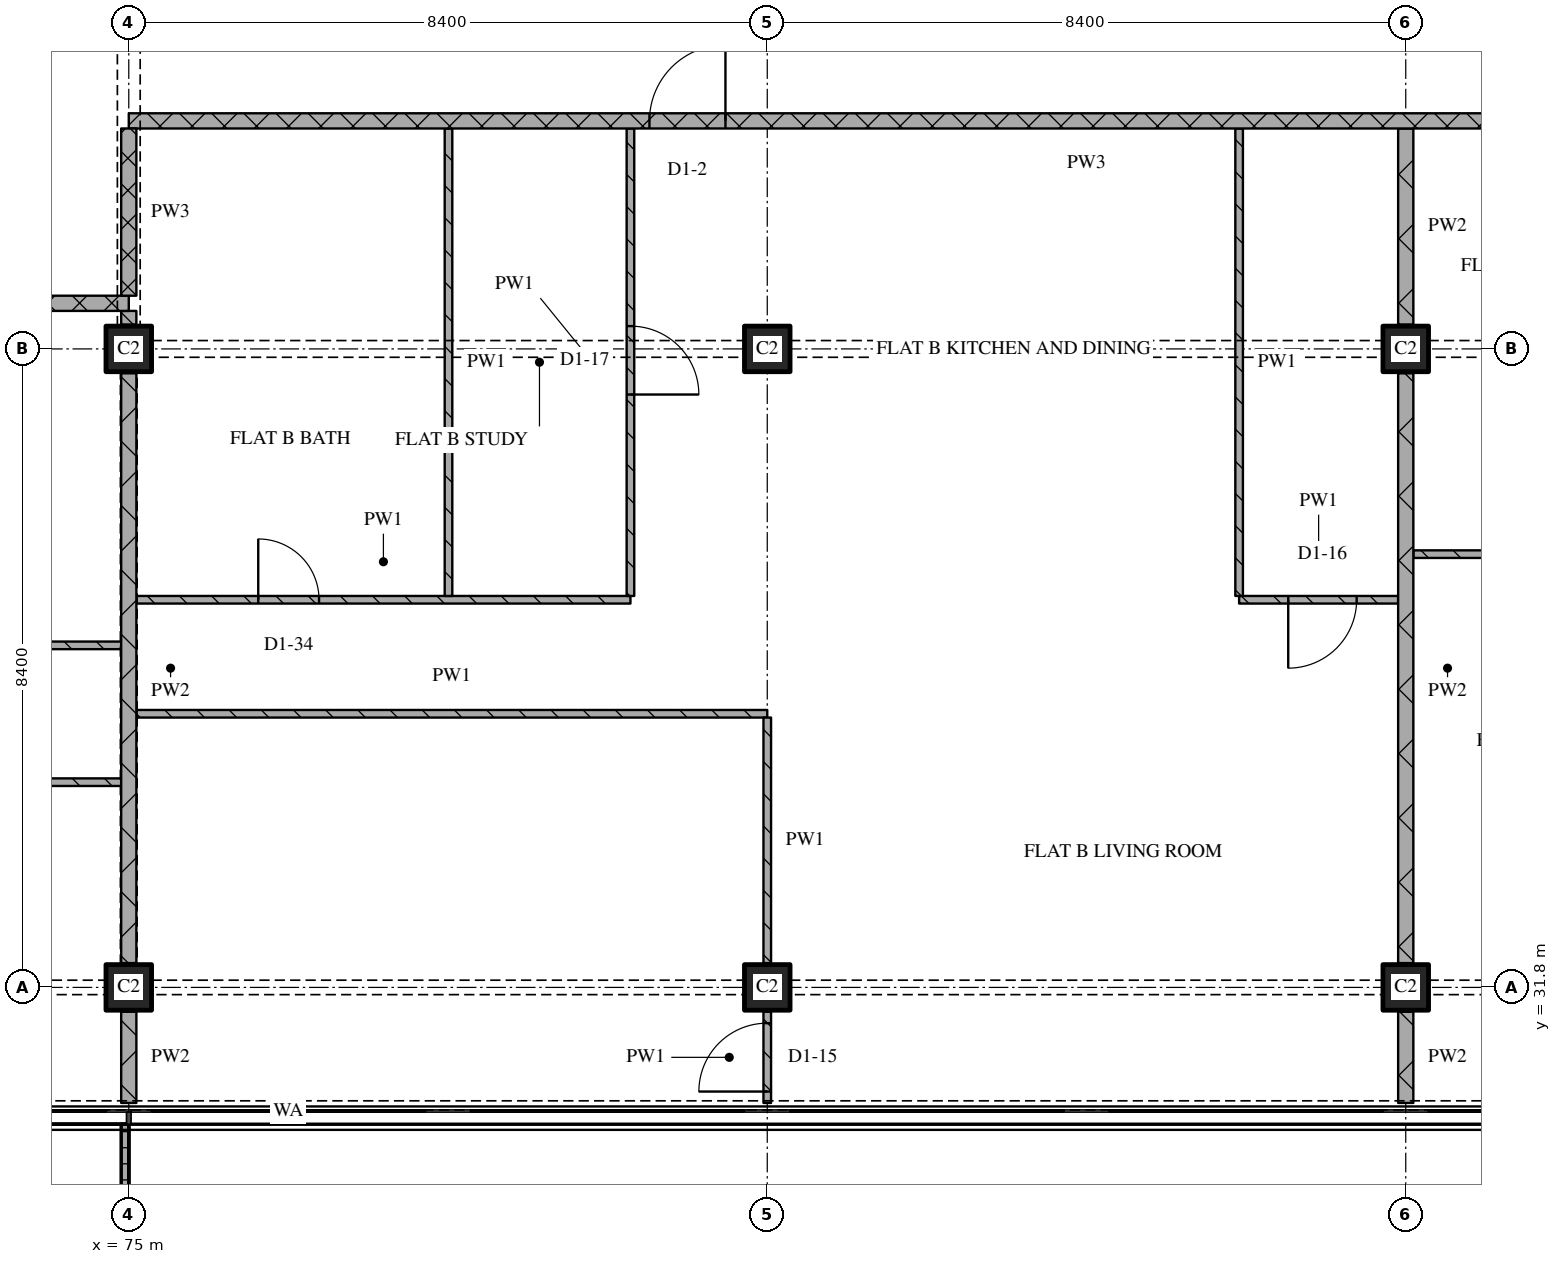
"""IFC4 building model, lengths in metres.
Left out: names, types, materials, properties, quantities, classifications, styles, units other than length and angle.
Written with IfcOpenShell. Run it as: python <this file> out.ifc"""

import sys

from ifc_helpers import new_model, si_unit, direction, frame, frame_2d, origin, origin_2d, place, context, subcontext, project, spatial, polyline, rectangle, outline, extrude, element, fill, save


model = new_model("IFC4")
c1 = context("Model", 3, precision=1e-05, world=origin(), true_north=direction((0.0, 1.0)))
c2 = subcontext(c1, "Body", "Model", "MODEL_VIEW")
j1 = project(units=[si_unit("LENGTHUNIT", "METRE"), si_unit("PLANEANGLEUNIT", "RADIAN")], contexts=[c1])
p1 = place(None, origin())
s1 = spatial("IfcSite", under=j1, at=p1, CompositionType="ELEMENT")
p2 = place(p1, origin())
s2 = spatial("IfcBuilding", under=s1, at=p2, CompositionType="ELEMENT")
p3 = place(p2, frame((0.0, 0.0, 212.7)))
s3 = spatial("IfcBuildingStorey", under=s2, at=p3, CompositionType="ELEMENT", Elevation=212.7)
for number, where, z_axis, x_axis in (
    (1, (75.0, 31.8, 0.0), (0.0, 0.0, 1.0), (1.0, 0.0, 0.0)),
    (2, (75.0, 40.2, 0.0), (0.0, 0.0, 1.0), (1.0, 0.0, 0.0)),
    (3, (83.4, 31.8, 0.0), (0.0, 0.0, 1.0), (1.0, 0.0, 0.0)),
    (4, (83.4, 40.2, 0.0), (0.0, 0.0, 1.0), (1.0, 0.0, 0.0)),
    (5, (91.8, 31.8, 0.0), (0.0, 0.0, 1.0), (1.0, 0.0, 0.0)),
    (6, (91.8, 40.2, 0.0), (0.0, 0.0, 1.0), (1.0, 0.0, 0.0)),
):
    element("IfcColumn", number, at=place(p3, frame(where, z_axis=z_axis, x_axis=x_axis)), inside=s3, PredefinedType="COLUMN", context=c2, shape_type="SweptSolid", body=[
        extrude(rectangle(XDim=0.6, YDim=0.6, at=origin_2d()), origin(), (0.0, 0.0, 1.0), 3.6),
    ])
p4 = place(p3, origin())
e7 = element("IfcWall", 7, at=p4, inside=s3, PredefinedType="SOLIDWALL", context=c2, shape_type="SweptSolid", body=[
    extrude(outline(polyline([(70.8, 30.0), (70.9, 30.0), (70.9, 28.367), (74.9, 28.367), (74.9, 30.0), (75.0, 30.0), (75.0, 28.267), (70.8, 28.267), (70.8, 30.0)])), origin(), (0.0, 0.0, 1.0), 1.0),
])
p5 = place(p3, frame((74.9, 34.5, 0.0), z_axis=(0.0, 0.0, 1.0), x_axis=(-1.0, 0.0, 0.0)))
e8 = element("IfcWall", 8, at=p5, inside=s3, PredefinedType="PARTITIONING", context=c2, shape_type="SweptSolid", body=[
    extrude(rectangle(XDim=12.5, YDim=0.1, at=frame_2d((6.25, 0.0))), origin(), (0.0, 0.0, 1.0), 3.32),
])
p6 = place(p5, frame((1.55, 0.0, 0.0)))
e9 = element("IfcOpeningElement", 9, at=p6, cuts=e8, PredefinedType="OPENING", context=c2, shape_type="SweptSolid", body=[
    extrude(rectangle(XDim=0.9, YDim=2.1, at=frame_2d((0.45, 1.05))), frame((0.0, 0.06, 0.0), z_axis=(0.0, -1.0, 0.0), x_axis=(1.0, 0.0, 0.0)), (0.0, 0.0, 1.0), 0.12),
])
p7 = place(p5, frame((7.85, 0.0, 0.0)))
e10 = element("IfcOpeningElement", 10, at=p7, cuts=e8, PredefinedType="OPENING", context=c2, shape_type="SweptSolid", body=[
    extrude(rectangle(XDim=0.9, YDim=2.1, at=frame_2d((0.45, 1.05))), frame((0.0, 0.06, 0.0), z_axis=(0.0, -1.0, 0.0), x_axis=(1.0, 0.0, 0.0)), (0.0, 0.0, 1.0), 0.12),
])
p8 = place(p3, frame((75.1, 35.4, 0.0), z_axis=(0.0, 0.0, 1.0), x_axis=(1.0, 0.0, 0.0)))
e11 = element("IfcWall", 11, at=p8, inside=s3, PredefinedType="PARTITIONING", context=c2, shape_type="SweptSolid", body=[
    extrude(rectangle(XDim=8.3, YDim=0.1, at=frame_2d((4.15, 0.0))), origin(), (0.0, 0.0, 1.0), 3.32),
])
p9 = place(p3, frame((68.4, 36.3, 0.0), z_axis=(0.0, 0.0, 1.0), x_axis=(1.0, 0.0, 0.0)))
e12 = element("IfcWall", 12, at=p9, inside=s3, PredefinedType="PARTITIONING", context=c2, shape_type="SweptSolid", body=[
    extrude(rectangle(XDim=6.5, YDim=0.1, at=frame_2d((3.25, 0.0))), origin(), (0.0, 0.0, 1.0), 3.32),
])
p10 = place(p9, frame((2.85, 0.0, 0.0)))
e13 = element("IfcOpeningElement", 13, at=p10, cuts=e12, PredefinedType="OPENING", context=c2, shape_type="SweptSolid", body=[
    extrude(rectangle(XDim=0.9, YDim=2.1, at=frame_2d((0.45, 1.05))), frame((0.0, 0.06, 0.0), z_axis=(0.0, -1.0, 0.0), x_axis=(1.0, 0.0, 0.0)), (0.0, 0.0, 1.0), 0.12),
])
p11 = place(p3, frame((75.1, 36.9, 0.0), z_axis=(0.0, 0.0, 1.0), x_axis=(1.0, 0.0, 0.0)))
e14 = element("IfcWall", 14, at=p11, inside=s3, PredefinedType="PARTITIONING", context=c2, shape_type="SweptSolid", body=[
    extrude(rectangle(XDim=6.5, YDim=0.1, at=frame_2d((3.25, 0.0))), origin(), (0.0, 0.0, 1.0), 3.32),
])
p12 = place(p11, frame((1.603, 0.0, 0.0)))
e15 = element("IfcOpeningElement", 15, at=p12, cuts=e14, PredefinedType="OPENING", context=c2, shape_type="SweptSolid", body=[
    extrude(rectangle(XDim=0.8, YDim=2.1, at=frame_2d((0.4, 1.05))), frame((0.0, 0.06, 0.0), z_axis=(0.0, -1.0, 0.0), x_axis=(1.0, 0.0, 0.0)), (0.0, 0.0, 1.0), 0.12),
])
p13 = place(p3, frame((89.608, 36.9, 0.0), z_axis=(0.0, 0.0, 1.0), x_axis=(1.0, 0.0, 0.0)))
e16 = element("IfcWall", 16, at=p13, inside=s3, PredefinedType="PARTITIONING", context=c2, shape_type="SweptSolid", body=[
    extrude(rectangle(XDim=2.092, YDim=0.1, at=frame_2d((1.046, 0.0))), origin(), (0.0, 0.0, 1.0), 3.32),
])
p14 = place(p13, frame((0.646, 0.0, 0.0)))
e17 = element("IfcOpeningElement", 17, at=p14, cuts=e16, PredefinedType="OPENING", context=c2, shape_type="SweptSolid", body=[
    extrude(rectangle(XDim=0.9, YDim=2.1, at=frame_2d((0.45, 1.05))), frame((0.0, 0.06, 0.0), z_axis=(0.0, -1.0, 0.0), x_axis=(1.0, 0.0, 0.0)), (0.0, 0.0, 1.0), 0.12),
])
p15 = place(p3, frame((91.9, 37.5, 0.0), z_axis=(0.0, 0.0, 1.0), x_axis=(1.0, 0.0, 0.0)))
e18 = element("IfcWall", 18, at=p15, inside=s3, PredefinedType="PARTITIONING", context=c2, shape_type="SweptSolid", body=[
    extrude(rectangle(XDim=2.9, YDim=0.1, at=frame_2d((1.45, 0.0))), origin(), (0.0, 0.0, 1.0), 3.32),
])
p16 = place(p15, frame((1.0, 0.0, 0.0)))
e19 = element("IfcOpeningElement", 19, at=p16, cuts=e18, PredefinedType="OPENING", context=c2, shape_type="SweptSolid", body=[
    extrude(rectangle(XDim=0.8, YDim=2.1, at=frame_2d((0.4, 1.05))), frame((0.0, 0.06, 0.0), z_axis=(0.0, -1.0, 0.0), x_axis=(1.0, 0.0, 0.0)), (0.0, 0.0, 1.0), 0.12),
])
p17 = place(p3, frame((75.0, 40.8, 0.0), z_axis=(0.0, 0.0, 1.0), x_axis=(-1.0, 0.0, 0.0)))
e20 = element("IfcWall", 20, at=p17, inside=s3, PredefinedType="PARTITIONING", context=c2, shape_type="SweptSolid", body=[
    extrude(rectangle(XDim=24.38, YDim=0.2, at=frame_2d((12.19, 0.0))), origin(), (0.0, 0.0, 1.0), 3.32),
])
p18 = place(p17, frame((14.35, 0.0, 0.0)))
e21 = element("IfcOpeningElement", 21, at=p18, cuts=e20, PredefinedType="OPENING", context=c2, shape_type="SweptSolid", body=[
    extrude(rectangle(XDim=1.0, YDim=2.1, at=frame_2d((0.5, 1.05))), frame((0.0, 0.11, 0.0), z_axis=(0.0, -1.0, 0.0), x_axis=(1.0, 0.0, 0.0)), (0.0, 0.0, 1.0), 0.22),
])
p19 = place(p3, frame((100.2, 43.2, 0.0), z_axis=(0.0, 0.0, 1.0), x_axis=(-1.0, 0.0, 0.0)))
e22 = element("IfcWall", 22, at=p19, inside=s3, PredefinedType="PARTITIONING", context=c2, shape_type="SweptSolid", body=[
    extrude(rectangle(XDim=25.2, YDim=0.2, at=frame_2d((12.6, 0.0))), origin(), (0.0, 0.0, 1.0), 3.32),
])
p20 = place(p19, frame((4.15, 0.0, 0.0)))
e23 = element("IfcOpeningElement", 23, at=p20, cuts=e22, PredefinedType="OPENING", context=c2, shape_type="SweptSolid", body=[
    extrude(rectangle(XDim=1.0, YDim=2.1, at=frame_2d((0.5, 1.05))), frame((0.0, 0.11, 0.0), z_axis=(0.0, -1.0, 0.0), x_axis=(1.0, 0.0, 0.0)), (0.0, 0.0, 1.0), 0.22),
])
p21 = place(p19, frame((17.35, 0.0, 0.0)))
e24 = element("IfcOpeningElement", 24, at=p21, cuts=e22, PredefinedType="OPENING", context=c2, shape_type="SweptSolid", body=[
    extrude(rectangle(XDim=1.0, YDim=2.1, at=frame_2d((0.5, 1.05))), frame((0.0, 0.11, 0.0), z_axis=(0.0, -1.0, 0.0), x_axis=(1.0, 0.0, 0.0)), (0.0, 0.0, 1.0), 0.22),
])
p22 = place(p3, frame((75.0, 43.1, 0.0), z_axis=(0.0, 0.0, 1.0), x_axis=(0.0, -1.0, 0.0)))
e25 = element("IfcWall", 25, at=p22, inside=s3, PredefinedType="PARTITIONING", context=c2, shape_type="SweptSolid", body=[
    extrude(rectangle(XDim=2.2, YDim=0.2, at=frame_2d((1.1, 0.0))), origin(), (0.0, 0.0, 1.0), 2.53),
])
p23 = place(p3, frame((75.0, 31.48, 0.0), z_axis=(0.0, 0.0, 1.0), x_axis=(0.0, -1.0, 0.0)))
e26 = element("IfcWall", 26, at=p23, inside=s3, PredefinedType="PARTITIONING", context=c2, shape_type="SweptSolid", body=[
    extrude(rectangle(XDim=1.2, YDim=0.2, at=frame_2d((0.6, 0.0))), origin(), (0.0, 0.0, 1.0), 3.32),
])
p24 = place(p3, frame((75.0, 39.88, 0.0), z_axis=(0.0, 0.0, 1.0), x_axis=(0.0, -1.0, 0.0)))
e27 = element("IfcWall", 27, at=p24, inside=s3, PredefinedType="PARTITIONING", context=c2, shape_type="SweptSolid", body=[
    extrude(rectangle(XDim=7.76, YDim=0.2, at=frame_2d((3.88, 0.0))), origin(), (0.0, 0.0, 1.0), 2.72),
])
p25 = place(p3, frame((75.0, 40.7, 0.0), z_axis=(0.0, 0.0, 1.0), x_axis=(0.0, -1.0, 0.0)))
e28 = element("IfcWall", 28, at=p25, inside=s3, PredefinedType="PARTITIONING", context=c2, shape_type="SweptSolid", body=[
    extrude(rectangle(XDim=0.18, YDim=0.2, at=frame_2d((0.09, 0.0))), origin(), (0.0, 0.0, 1.0), 3.32),
])
p26 = place(p3, frame((79.206, 43.1, 0.0), z_axis=(0.0, 0.0, 1.0), x_axis=(0.0, -1.0, 0.0)))
e29 = element("IfcWall", 29, at=p26, inside=s3, PredefinedType="PARTITIONING", context=c2, shape_type="SweptSolid", body=[
    extrude(rectangle(XDim=6.15, YDim=0.1, at=frame_2d((3.075, 0.0))), origin(), (0.0, 0.0, 1.0), 3.32),
])
p27 = place(p3, frame((81.6, 36.95, 0.0), z_axis=(0.0, 0.0, 1.0), x_axis=(0.0, 1.0, 0.0)))
e30 = element("IfcWall", 30, at=p27, inside=s3, PredefinedType="PARTITIONING", context=c2, shape_type="SweptSolid", body=[
    extrude(rectangle(XDim=6.15, YDim=0.1, at=frame_2d((3.075, 0.0))), origin(), (0.0, 0.0, 1.0), 3.32),
])
p28 = place(p27, frame((2.65, 0.0, 0.0)))
e31 = element("IfcOpeningElement", 31, at=p28, cuts=e30, PredefinedType="OPENING", context=c2, shape_type="SweptSolid", body=[
    extrude(rectangle(XDim=0.9, YDim=2.1, at=frame_2d((0.45, 1.05))), frame((0.0, 0.06, 0.0), z_axis=(0.0, -1.0, 0.0), x_axis=(1.0, 0.0, 0.0)), (0.0, 0.0, 1.0), 0.12),
])
p29 = place(p3, frame((83.4, 30.28, 0.0), z_axis=(0.0, 0.0, 1.0), x_axis=(0.0, 1.0, 0.0)))
e32 = element("IfcWall", 32, at=p29, inside=s3, PredefinedType="PARTITIONING", context=c2, shape_type="SweptSolid", body=[
    extrude(rectangle(XDim=1.2, YDim=0.1, at=frame_2d((0.6, 0.0))), origin(), (0.0, 0.0, 1.0), 3.32),
])
p30 = place(p29, frame((0.15, 0.0, 0.0)))
e33 = element("IfcOpeningElement", 33, at=p30, cuts=e32, PredefinedType="OPENING", context=c2, shape_type="SweptSolid", body=[
    extrude(rectangle(XDim=0.9, YDim=2.1, at=frame_2d((0.45, 1.05))), frame((0.0, 0.06, 0.0), z_axis=(0.0, -1.0, 0.0), x_axis=(1.0, 0.0, 0.0)), (0.0, 0.0, 1.0), 0.12),
])
p31 = place(p3, frame((83.4, 35.35, 0.0), z_axis=(0.0, 0.0, 1.0), x_axis=(0.0, -1.0, 0.0)))
e34 = element("IfcWall", 34, at=p31, inside=s3, PredefinedType="PARTITIONING", context=c2, shape_type="SweptSolid", body=[
    extrude(rectangle(XDim=3.23, YDim=0.1, at=frame_2d((1.615, 0.0))), origin(), (0.0, 0.0, 1.0), 3.32),
])
p32 = place(p3, frame((89.608, 43.1, 0.0), z_axis=(0.0, 0.0, 1.0), x_axis=(0.0, -1.0, 0.0)))
e35 = element("IfcWall", 35, at=p32, inside=s3, PredefinedType="PARTITIONING", context=c2, shape_type="SweptSolid", body=[
    extrude(rectangle(XDim=6.15, YDim=0.1, at=frame_2d((3.075, 0.0))), origin(), (0.0, 0.0, 1.0), 3.32),
])
p33 = place(p3, frame((91.8, 31.48, 0.0), z_axis=(0.0, 0.0, 1.0), x_axis=(0.0, -1.0, 0.0)))
e36 = element("IfcWall", 36, at=p33, inside=s3, PredefinedType="PARTITIONING", context=c2, shape_type="SweptSolid", body=[
    extrude(rectangle(XDim=1.2, YDim=0.2, at=frame_2d((0.6, 0.0))), origin(), (0.0, 0.0, 1.0), 3.32),
])
p34 = place(p3, frame((91.8, 39.88, 0.0), z_axis=(0.0, 0.0, 1.0), x_axis=(0.0, -1.0, 0.0)))
e37 = element("IfcWall", 37, at=p34, inside=s3, PredefinedType="PARTITIONING", context=c2, shape_type="SweptSolid", body=[
    extrude(rectangle(XDim=7.76, YDim=0.2, at=frame_2d((3.88, 0.0))), origin(), (0.0, 0.0, 1.0), 3.32),
])
p35 = place(p3, frame((91.8, 43.1, 0.0), z_axis=(0.0, 0.0, 1.0), x_axis=(0.0, -1.0, 0.0)))
e38 = element("IfcWall", 38, at=p35, inside=s3, PredefinedType="PARTITIONING", context=c2, shape_type="SweptSolid", body=[
    extrude(rectangle(XDim=2.58, YDim=0.2, at=frame_2d((1.29, 0.0))), origin(), (0.0, 0.0, 1.0), 3.32),
])
p36 = place(p12, origin())
e39 = element("IfcDoor", 39, at=p36, inside=s3, OperationType="SINGLE_SWING_LEFT", PredefinedType="DOOR", context=c2, shape_type="SweptSolid", body=[
    extrude(rectangle(XDim=0.8, YDim=2.1, at=frame_2d((0.4, 1.05))), frame((0.0, 0.025, 0.0), z_axis=(0.0, -1.0, 0.0), x_axis=(1.0, 0.0, 0.0)), (0.0, 0.0, 1.0), 0.05),
])
fill(e15, e39)
p37 = place(p14, origin())
e40 = element("IfcDoor", 40, at=p37, inside=s3, OperationType="SINGLE_SWING_RIGHT", PredefinedType="DOOR", context=c2, shape_type="SweptSolid", body=[
    extrude(rectangle(XDim=0.9, YDim=2.1, at=frame_2d((0.45, 1.05))), frame((0.0, 0.025, 0.0), z_axis=(0.0, -1.0, 0.0), x_axis=(1.0, 0.0, 0.0)), (0.0, 0.0, 1.0), 0.05),
])
fill(e17, e40)
p38 = place(p21, origin())
e41 = element("IfcDoor", 41, at=p38, inside=s3, OperationType="SINGLE_SWING_RIGHT", PredefinedType="DOOR", context=c2, shape_type="SweptSolid", body=[
    extrude(rectangle(XDim=1.0, YDim=2.1, at=frame_2d((0.5, 1.05))), frame((0.0, 0.025, 0.0), z_axis=(0.0, -1.0, 0.0), x_axis=(1.0, 0.0, 0.0)), (0.0, 0.0, 1.0), 0.05),
])
fill(e24, e41)
p39 = place(p28, origin())
e42 = element("IfcDoor", 42, at=p39, inside=s3, OperationType="SINGLE_SWING_RIGHT", PredefinedType="DOOR", context=c2, shape_type="SweptSolid", body=[
    extrude(rectangle(XDim=0.9, YDim=2.1, at=frame_2d((0.45, 1.05))), frame((0.0, 0.025, 0.0), z_axis=(0.0, -1.0, 0.0), x_axis=(1.0, 0.0, 0.0)), (0.0, 0.0, 1.0), 0.05),
])
fill(e31, e42)
p40 = place(p30, origin())
e43 = element("IfcDoor", 43, at=p40, inside=s3, OperationType="SINGLE_SWING_LEFT", PredefinedType="DOOR", context=c2, shape_type="SweptSolid", body=[
    extrude(rectangle(XDim=0.9, YDim=2.1, at=frame_2d((0.45, 1.05))), frame((0.0, 0.025, 0.0), z_axis=(0.0, -1.0, 0.0), x_axis=(1.0, 0.0, 0.0)), (0.0, 0.0, 1.0), 0.05),
])
fill(e33, e43)
save(model, sys.argv[1])
